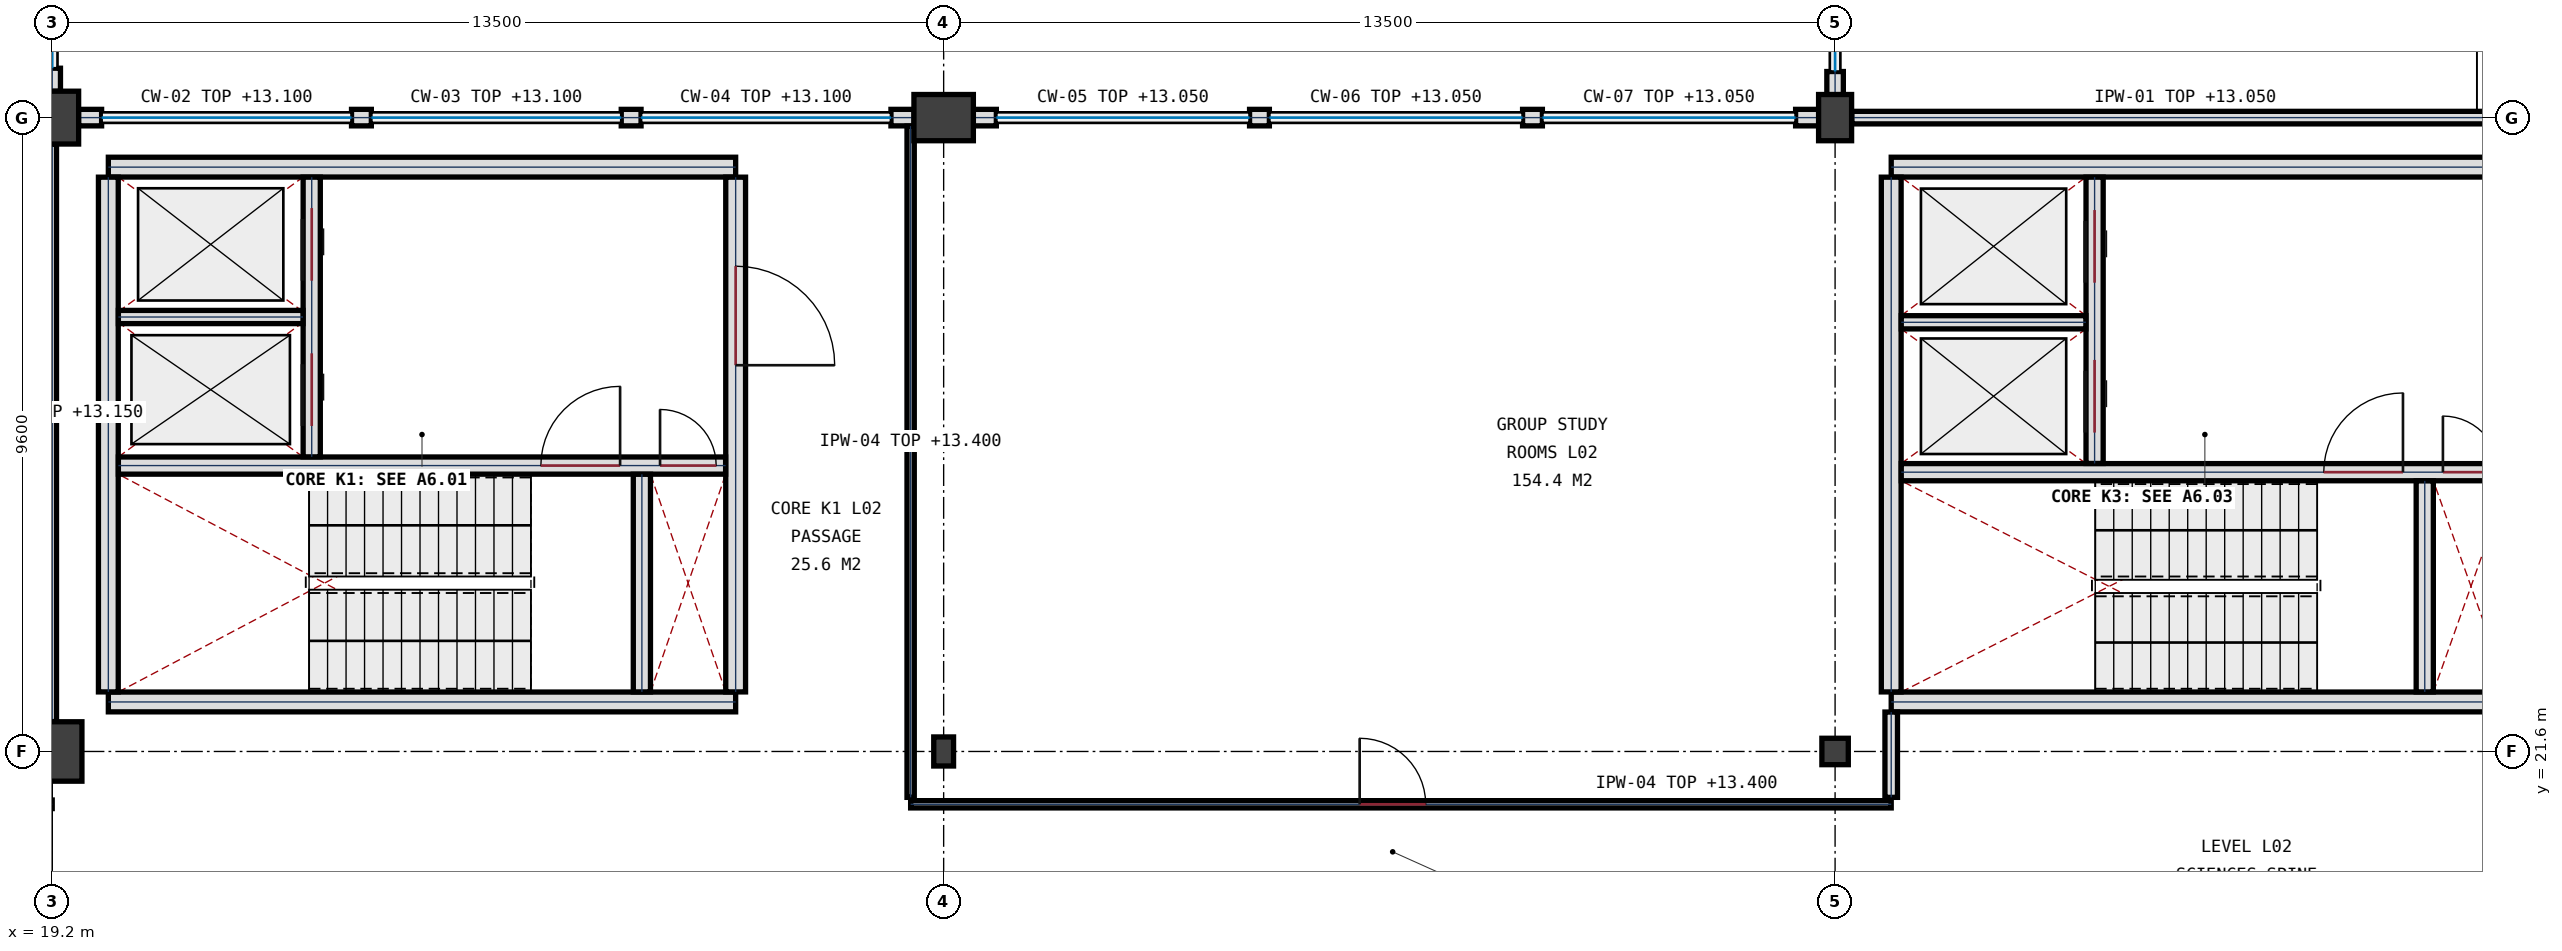
"""IFC4 building model, lengths in metres.
Left out: names, types, materials, properties, quantities, classifications, styles, units other than length and angle.
Written with IfcOpenShell. Run it as: python <this file> out.ifc"""

import sys

from ifc_helpers import new_model, si_unit, direction, frame, frame_2d, origin, origin_2d, place, context, subcontext, project, spatial, rectangle, hollow_rectangle, circle, i_section, extrude, element, fill, save


model = new_model("IFC4")
c1 = context("Model", 3, precision=1e-05, world=origin(), true_north=direction((0.0, 1.0)))
c2 = subcontext(c1, "Body", "Model", "MODEL_VIEW")
j1 = project(units=[si_unit("LENGTHUNIT", "METRE"), si_unit("PLANEANGLEUNIT", "RADIAN")], contexts=[c1])
p1 = place(None, origin())
s1 = spatial("IfcSite", under=j1, at=p1, CompositionType="ELEMENT")
p2 = place(p1, origin())
s2 = spatial("IfcBuilding", under=s1, at=p2, CompositionType="ELEMENT")
p3 = place(p2, frame((0.0, 0.0, 9.9)))
s3 = spatial("IfcBuildingStorey", under=s2, at=p3, CompositionType="ELEMENT", Elevation=9.9)
p4 = place(p3, frame((19.2, 21.6, 0.0), z_axis=(0.0, 0.0, 1.0), x_axis=(1.0, 0.0, 0.0)))
e1 = element("IfcColumn", 1, at=p4, inside=s3, PredefinedType="COLUMN", context=c2, shape_type="SweptSolid", body=[
    extrude(circle(Radius=0.45, at=origin_2d()), origin(), (0.0, 0.0, 1.0), 4.5),
])
p5 = place(p3, frame((19.2, 31.2, 0.0), z_axis=(0.0, 0.0, 1.0), x_axis=(1.0, 0.0, 0.0)))
e2 = element("IfcColumn", 2, at=p5, inside=s3, PredefinedType="COLUMN", context=c2, shape_type="SweptSolid", body=[
    extrude(circle(Radius=0.4, at=origin_2d()), origin(), (0.0, 0.0, 1.0), 4.5),
])
p6 = place(p3, frame((32.7, 21.6, 0.0), z_axis=(0.0, 0.0, 1.0), x_axis=(1.0, 0.0, 0.0)))
e3 = element("IfcColumn", 3, at=p6, inside=s3, PredefinedType="COLUMN", context=c2, shape_type="SweptSolid", body=[
    extrude(i_section(OverallWidth=0.3, OverallDepth=0.44, WebThickness=0.011, FlangeThickness=0.021, FilletRadius=0.027, at=origin_2d()), origin(), (0.0, 0.0, 1.0), 4.5),
])
p7 = place(p3, frame((32.7, 31.2, 0.0), z_axis=(0.0, 0.0, 1.0), x_axis=(1.0, 0.0, 0.0)))
e4 = element("IfcColumn", 4, at=p7, inside=s3, PredefinedType="COLUMN", context=c2, shape_type="SweptSolid", body=[
    extrude(rectangle(XDim=0.9, YDim=0.7, at=origin_2d()), origin(), (0.0, 0.0, 1.0), 4.5),
])
p8 = place(p3, frame((46.2, 21.6, 0.0), z_axis=(0.0, 0.0, 1.0), x_axis=(1.0, 0.0, 0.0)))
e5 = element("IfcColumn", 5, at=p8, inside=s3, PredefinedType="COLUMN", context=c2, shape_type="SweptSolid", body=[
    extrude(hollow_rectangle(XDim=0.4, YDim=0.4, WallThickness=0.016, at=origin_2d()), origin(), (0.0, 0.0, 1.0), 4.5),
])
p9 = place(p3, frame((46.2, 31.2, 0.0), z_axis=(0.0, 0.0, 1.0), x_axis=(0.0, 1.0, 0.0)))
e6 = element("IfcColumn", 6, at=p9, inside=s3, PredefinedType="COLUMN", context=c2, shape_type="SweptSolid", body=[
    extrude(rectangle(XDim=0.7, YDim=0.5, at=origin_2d()), origin(), (0.0, 0.0, 1.0), 4.5),
])
p10 = place(p3, frame((19.2, 31.948, 0.0), z_axis=(0.0, 0.0, 1.0), x_axis=(0.0, -1.0, 0.0)))
e7 = element("IfcWall", 7, at=p10, inside=s3, PredefinedType="SOLIDWALL", context=c2, shape_type="SweptSolid", body=[
    extrude(rectangle(XDim=0.35, YDim=0.25, at=frame_2d((0.175, 0.0))), origin(), (0.0, 0.0, 1.0), 3.25),
])
p11 = place(p3, frame((19.598, 31.2, 0.0), z_axis=(0.0, 0.0, 1.0), x_axis=(1.0, 0.0, 0.0)))
e8 = element("IfcWall", 8, at=p11, inside=s3, PredefinedType="SOLIDWALL", context=c2, shape_type="SweptSolid", body=[
    extrude(rectangle(XDim=0.35, YDim=0.25, at=frame_2d((0.175, 0.0))), origin(), (0.0, 0.0, 1.0), 3.2),
])
p12 = place(p3, frame((31.902, 31.2, 0.0), z_axis=(0.0, 0.0, 1.0), x_axis=(1.0, 0.0, 0.0)))
e9 = element("IfcWall", 9, at=p12, inside=s3, PredefinedType="SOLIDWALL", context=c2, shape_type="SweptSolid", body=[
    extrude(rectangle(XDim=0.35, YDim=0.25, at=frame_2d((0.175, 0.0))), origin(), (0.0, 0.0, 1.0), 3.2),
])
for number, where, z_axis, x_axis in (
    (10, (23.733, 31.2, 0.0), (0.0, 0.0, 1.0), (1.0, 0.0, 0.0)),
    (11, (27.817, 31.2, 0.0), (0.0, 0.0, 1.0), (1.0, 0.0, 0.0)),
):
    element("IfcWall", number, at=place(p3, frame(where, z_axis=z_axis, x_axis=x_axis)), inside=s3, PredefinedType="SOLIDWALL", context=c2, shape_type="SweptSolid", body=[
        extrude(rectangle(XDim=0.3, YDim=0.25, at=frame_2d((0.15, 0.0))), origin(), (0.0, 0.0, 1.0), 3.2),
    ])
p13 = place(p3, frame((33.148, 31.2, 0.0), z_axis=(0.0, 0.0, 1.0), x_axis=(1.0, 0.0, 0.0)))
e12 = element("IfcWall", 12, at=p13, inside=s3, PredefinedType="SOLIDWALL", context=c2, shape_type="SweptSolid", body=[
    extrude(rectangle(XDim=0.35, YDim=0.25, at=frame_2d((0.175, 0.0))), origin(), (0.0, 0.0, 1.0), 3.15),
])
p14 = place(p3, frame((45.602, 31.2, 0.0), z_axis=(0.0, 0.0, 1.0), x_axis=(1.0, 0.0, 0.0)))
e13 = element("IfcWall", 13, at=p14, inside=s3, PredefinedType="SOLIDWALL", context=c2, shape_type="SweptSolid", body=[
    extrude(rectangle(XDim=0.35, YDim=0.25, at=frame_2d((0.175, 0.0))), origin(), (0.0, 0.0, 1.0), 3.15),
])
p15 = place(p3, frame((37.333, 31.2, 0.0), z_axis=(0.0, 0.0, 1.0), x_axis=(1.0, 0.0, 0.0)))
e14 = element("IfcWall", 14, at=p15, inside=s3, PredefinedType="SOLIDWALL", context=c2, shape_type="SweptSolid", body=[
    extrude(rectangle(XDim=0.3, YDim=0.25, at=frame_2d((0.15, 0.0))), origin(), (0.0, 0.0, 1.0), 3.15),
])
p16 = place(p3, frame((41.467, 31.2, 0.0), z_axis=(0.0, 0.0, 1.0), x_axis=(1.0, 0.0, 0.0)))
e15 = element("IfcWall", 15, at=p16, inside=s3, PredefinedType="SOLIDWALL", context=c2, shape_type="SweptSolid", body=[
    extrude(rectangle(XDim=0.3, YDim=0.25, at=frame_2d((0.15, 0.0))), origin(), (0.0, 0.0, 1.0), 3.15),
])
p17 = place(p3, frame((46.2, 31.548, 0.0), z_axis=(0.0, 0.0, 1.0), x_axis=(0.0, 1.0, 0.0)))
e16 = element("IfcWall", 16, at=p17, inside=s3, PredefinedType="SOLIDWALL", context=c2, shape_type="SweptSolid", body=[
    extrude(rectangle(XDim=0.35, YDim=0.25, at=frame_2d((0.175, 0.0))), origin(), (0.0, 0.0, 1.0), 3.15),
])
for number, where, z_axis, x_axis in (
    (17, (29.55, 22.35, 0.0), (0.0, 0.0, 1.0), (-1.0, 0.0, 0.0)),
    (18, (20.05, 30.45, 0.0), (0.0, 0.0, 1.0), (1.0, 0.0, 0.0)),
):
    element("IfcWall", number, at=place(p3, frame(where, z_axis=z_axis, x_axis=x_axis)), inside=s3, PredefinedType="SHEAR", context=c2, shape_type="SweptSolid", body=[
        extrude(rectangle(XDim=9.5, YDim=0.3, at=frame_2d((4.75, 0.0))), origin(), (0.0, 0.0, 1.0), 4.5),
    ])
p18 = place(p3, frame((20.05, 22.502, 0.0), z_axis=(0.0, 0.0, 1.0), x_axis=(0.0, 1.0, 0.0)))
e19 = element("IfcWall", 19, at=p18, inside=s3, PredefinedType="SHEAR", context=c2, shape_type="SweptSolid", body=[
    extrude(rectangle(XDim=7.796, YDim=0.3, at=frame_2d((3.898, 0.0))), origin(), (0.0, 0.0, 1.0), 4.5),
])
p19 = place(p3, frame((29.55, 30.298, 0.0), z_axis=(0.0, 0.0, 1.0), x_axis=(0.0, -1.0, 0.0)))
e20 = element("IfcWall", 20, at=p19, inside=s3, PredefinedType="SHEAR", context=c2, shape_type="SweptSolid", body=[
    extrude(rectangle(XDim=7.796, YDim=0.3, at=frame_2d((3.898, 0.0))), origin(), (0.0, 0.0, 1.0), 4.5),
])
p20 = place(p19, frame((1.348, 0.0, 0.0)))
e21 = element("IfcOpeningElement", 21, at=p20, cuts=e20, PredefinedType="OPENING", context=c2, shape_type="SweptSolid", body=[
    extrude(rectangle(XDim=1.5, YDim=2.25, at=frame_2d((0.75, 1.125))), frame((0.0, 0.16, 0.0), z_axis=(0.0, -1.0, 0.0), x_axis=(1.0, 0.0, 0.0)), (0.0, 0.0, 1.0), 0.32),
])
p21 = place(p3, frame((20.202, 25.93, 0.0), z_axis=(0.0, 0.0, 1.0), x_axis=(1.0, 0.0, 0.0)))
e22 = element("IfcWall", 22, at=p21, inside=s3, PredefinedType="SHEAR", context=c2, shape_type="SweptSolid", body=[
    extrude(rectangle(XDim=9.196, YDim=0.26, at=frame_2d((4.598, 0.0))), origin(), (0.0, 0.0, 1.0), 4.5),
])
p22 = place(p21, frame((6.398, 0.0, 0.0)))
e23 = element("IfcOpeningElement", 23, at=p22, cuts=e22, PredefinedType="OPENING", context=c2, shape_type="SweptSolid", body=[
    extrude(rectangle(XDim=1.2, YDim=2.2, at=frame_2d((0.6, 1.1))), frame((0.0, 0.14, 0.0), z_axis=(0.0, -1.0, 0.0), x_axis=(1.0, 0.0, 0.0)), (0.0, 0.0, 1.0), 0.28),
])
p23 = place(p21, frame((8.203, 0.0, 0.0)))
e24 = element("IfcOpeningElement", 24, at=p23, cuts=e22, PredefinedType="OPENING", context=c2, shape_type="SweptSolid", body=[
    extrude(rectangle(XDim=0.85, YDim=2.05, at=frame_2d((0.425, 1.025))), frame((0.0, 0.14, 0.0), z_axis=(0.0, -1.0, 0.0), x_axis=(1.0, 0.0, 0.0)), (0.0, 0.0, 1.0), 0.28),
])
p24 = place(p3, frame((28.13, 22.502, 0.0), z_axis=(0.0, 0.0, 1.0), x_axis=(0.0, 1.0, 0.0)))
e25 = element("IfcWall", 25, at=p24, inside=s3, PredefinedType="SHEAR", context=c2, shape_type="SweptSolid", body=[
    extrude(rectangle(XDim=3.296, YDim=0.26, at=frame_2d((1.648, 0.0))), origin(), (0.0, 0.0, 1.0), 4.5),
])
p25 = place(p3, frame((23.13, 26.062, 0.0), z_axis=(0.0, 0.0, 1.0), x_axis=(0.0, 1.0, 0.0)))
e26 = element("IfcWall", 26, at=p25, inside=s3, PredefinedType="SHEAR", context=c2, shape_type="SweptSolid", body=[
    extrude(rectangle(XDim=4.236, YDim=0.26, at=frame_2d((2.118, 0.0))), origin(), (0.0, 0.0, 1.0), 4.5),
])
p26 = place(p25, frame((0.468, 0.0, 0.0)))
e27 = element("IfcOpeningElement", 27, at=p26, cuts=e26, PredefinedType="OPENING", context=c2, shape_type="SweptSolid", body=[
    extrude(rectangle(XDim=1.1, YDim=2.15, at=frame_2d((0.55, 1.075))), frame((0.0, 0.14, 0.0), z_axis=(0.0, -1.0, 0.0), x_axis=(1.0, 0.0, 0.0)), (0.0, 0.0, 1.0), 0.28),
])
p27 = place(p25, frame((2.668, 0.0, 0.0)))
e28 = element("IfcOpeningElement", 28, at=p27, cuts=e26, PredefinedType="OPENING", context=c2, shape_type="SweptSolid", body=[
    extrude(rectangle(XDim=1.1, YDim=2.15, at=frame_2d((0.55, 1.075))), frame((0.0, 0.14, 0.0), z_axis=(0.0, -1.0, 0.0), x_axis=(1.0, 0.0, 0.0)), (0.0, 0.0, 1.0), 0.28),
])
p28 = place(p3, frame((20.202, 28.18, 0.0), z_axis=(0.0, 0.0, 1.0), x_axis=(1.0, 0.0, 0.0)))
e29 = element("IfcWall", 29, at=p28, inside=s3, PredefinedType="PLUMBINGWALL", context=c2, shape_type="SweptSolid", body=[
    extrude(rectangle(XDim=2.796, YDim=0.2, at=frame_2d((1.398, 0.0))), origin(), (0.0, 0.0, 1.0), 4.16),
])
for number, where, z_axis, x_axis in (
    (30, (56.55, 22.35, 0.0), (0.0, 0.0, 1.0), (-1.0, 0.0, 0.0)),
    (31, (47.05, 30.45, 0.0), (0.0, 0.0, 1.0), (1.0, 0.0, 0.0)),
):
    element("IfcWall", number, at=place(p3, frame(where, z_axis=z_axis, x_axis=x_axis)), inside=s3, PredefinedType="SHEAR", context=c2, shape_type="SweptSolid", body=[
        extrude(rectangle(XDim=9.5, YDim=0.3, at=frame_2d((4.75, 0.0))), origin(), (0.0, 0.0, 1.0), 4.5),
    ])
p29 = place(p3, frame((47.05, 22.502, 0.0), z_axis=(0.0, 0.0, 1.0), x_axis=(0.0, 1.0, 0.0)))
e32 = element("IfcWall", 32, at=p29, inside=s3, PredefinedType="SHEAR", context=c2, shape_type="SweptSolid", body=[
    extrude(rectangle(XDim=7.796, YDim=0.3, at=frame_2d((3.898, 0.0))), origin(), (0.0, 0.0, 1.0), 4.5),
])
p30 = place(p3, frame((47.202, 25.83, 0.0), z_axis=(0.0, 0.0, 1.0), x_axis=(1.0, 0.0, 0.0)))
e33 = element("IfcWall", 33, at=p30, inside=s3, PredefinedType="SHEAR", context=c2, shape_type="SweptSolid", body=[
    extrude(rectangle(XDim=9.196, YDim=0.26, at=frame_2d((4.598, 0.0))), origin(), (0.0, 0.0, 1.0), 4.5),
])
p31 = place(p30, frame((6.398, 0.0, 0.0)))
e34 = element("IfcOpeningElement", 34, at=p31, cuts=e33, PredefinedType="OPENING", context=c2, shape_type="SweptSolid", body=[
    extrude(rectangle(XDim=1.2, YDim=2.2, at=frame_2d((0.6, 1.1))), frame((0.0, 0.14, 0.0), z_axis=(0.0, -1.0, 0.0), x_axis=(1.0, 0.0, 0.0)), (0.0, 0.0, 1.0), 0.28),
])
p32 = place(p30, frame((8.203, 0.0, 0.0)))
e35 = element("IfcOpeningElement", 35, at=p32, cuts=e33, PredefinedType="OPENING", context=c2, shape_type="SweptSolid", body=[
    extrude(rectangle(XDim=0.85, YDim=2.05, at=frame_2d((0.425, 1.025))), frame((0.0, 0.14, 0.0), z_axis=(0.0, -1.0, 0.0), x_axis=(1.0, 0.0, 0.0)), (0.0, 0.0, 1.0), 0.28),
])
p33 = place(p3, frame((55.13, 22.502, 0.0), z_axis=(0.0, 0.0, 1.0), x_axis=(0.0, 1.0, 0.0)))
e36 = element("IfcWall", 36, at=p33, inside=s3, PredefinedType="SHEAR", context=c2, shape_type="SweptSolid", body=[
    extrude(rectangle(XDim=3.196, YDim=0.26, at=frame_2d((1.598, 0.0))), origin(), (0.0, 0.0, 1.0), 4.5),
])
p34 = place(p3, frame((50.13, 25.962, 0.0), z_axis=(0.0, 0.0, 1.0), x_axis=(0.0, 1.0, 0.0)))
e37 = element("IfcWall", 37, at=p34, inside=s3, PredefinedType="SHEAR", context=c2, shape_type="SweptSolid", body=[
    extrude(rectangle(XDim=4.336, YDim=0.26, at=frame_2d((2.168, 0.0))), origin(), (0.0, 0.0, 1.0), 4.5),
])
p35 = place(p34, frame((0.468, 0.0, 0.0)))
e38 = element("IfcOpeningElement", 38, at=p35, cuts=e37, PredefinedType="OPENING", context=c2, shape_type="SweptSolid", body=[
    extrude(rectangle(XDim=1.1, YDim=2.15, at=frame_2d((0.55, 1.075))), frame((0.0, 0.14, 0.0), z_axis=(0.0, -1.0, 0.0), x_axis=(1.0, 0.0, 0.0)), (0.0, 0.0, 1.0), 0.28),
])
p36 = place(p34, frame((2.738, 0.0, 0.0)))
e39 = element("IfcOpeningElement", 39, at=p36, cuts=e37, PredefinedType="OPENING", context=c2, shape_type="SweptSolid", body=[
    extrude(rectangle(XDim=1.1, YDim=2.15, at=frame_2d((0.55, 1.075))), frame((0.0, 0.14, 0.0), z_axis=(0.0, -1.0, 0.0), x_axis=(1.0, 0.0, 0.0)), (0.0, 0.0, 1.0), 0.28),
])
p37 = place(p3, frame((47.202, 28.1, 0.0), z_axis=(0.0, 0.0, 1.0), x_axis=(1.0, 0.0, 0.0)))
e40 = element("IfcWall", 40, at=p37, inside=s3, PredefinedType="PLUMBINGWALL", context=c2, shape_type="SweptSolid", body=[
    extrude(rectangle(XDim=2.796, YDim=0.2, at=frame_2d((1.398, 0.0))), origin(), (0.0, 0.0, 1.0), 4.16),
])
p38 = place(p3, frame((32.2, 20.8, 0.0), z_axis=(0.0, 0.0, 1.0), x_axis=(1.0, 0.0, 0.0)))
e41 = element("IfcWall", 41, at=p38, inside=s3, PredefinedType="PARTITIONING", context=c2, shape_type="SweptSolid", body=[
    extrude(rectangle(XDim=14.85, YDim=0.11, at=frame_2d((7.425, 0.0))), origin(), (0.0, 0.0, 1.0), 3.5),
])
p39 = place(p38, frame((6.8, 0.0, 0.0)))
e42 = element("IfcOpeningElement", 42, at=p39, cuts=e41, PredefinedType="OPENING", context=c2, shape_type="SweptSolid", body=[
    extrude(rectangle(XDim=1.0, YDim=2.2, at=frame_2d((0.5, 1.1))), frame((0.0, 0.065, 0.0), z_axis=(0.0, -1.0, 0.0), x_axis=(1.0, 0.0, 0.0)), (0.0, 0.0, 1.0), 0.13),
])
p40 = place(p3, frame((46.453, 31.2, 0.0), z_axis=(0.0, 0.0, 1.0), x_axis=(1.0, 0.0, 0.0)))
e43 = element("IfcWall", 43, at=p40, inside=s3, PredefinedType="PARTITIONING", context=c2, shape_type="SweptSolid", body=[
    extrude(rectangle(XDim=10.097, YDim=0.19, at=frame_2d((5.049, 0.0))), origin(), (0.0, 0.0, 1.0), 3.15),
])
p41 = place(p3, frame((19.2, 22.053, 0.0), z_axis=(0.0, 0.0, 1.0), x_axis=(0.0, 1.0, 0.0)))
e44 = element("IfcWall", 44, at=p41, inside=s3, PredefinedType="PARTITIONING", context=c2, shape_type="SweptSolid", body=[
    extrude(rectangle(XDim=8.744, YDim=0.13, at=frame_2d((4.372, 0.0))), origin(), (0.0, 0.0, 1.0), 3.25),
])
p42 = place(p3, frame((32.2, 20.905, 0.0), z_axis=(0.0, 0.0, 1.0), x_axis=(0.0, 1.0, 0.0)))
e45 = element("IfcWall", 45, at=p42, inside=s3, PredefinedType="PARTITIONING", context=c2, shape_type="SweptSolid", body=[
    extrude(rectangle(XDim=10.166, YDim=0.11, at=frame_2d((5.083, 0.0))), origin(), (0.0, 0.0, 1.0), 3.5),
])
p43 = place(p3, frame((47.05, 20.905, 0.0), z_axis=(0.0, 0.0, 1.0), x_axis=(0.0, 1.0, 0.0)))
e46 = element("IfcWall", 46, at=p43, inside=s3, PredefinedType="PARTITIONING", context=c2, shape_type="SweptSolid", body=[
    extrude(rectangle(XDim=1.292, YDim=0.19, at=frame_2d((0.646, 0.0))), origin(), (0.0, 0.0, 1.0), 3.3),
])
p44 = place(p20, origin())
e47 = element("IfcDoor", 47, at=p44, inside=s3, OperationType="SINGLE_SWING_RIGHT", PredefinedType="DOOR", context=c2, shape_type="SweptSolid", body=[
    extrude(rectangle(XDim=1.5, YDim=2.25, at=frame_2d((0.75, 1.125))), frame((0.0, 0.032, 0.0), z_axis=(0.0, -1.0, 0.0), x_axis=(1.0, 0.0, 0.0)), (0.0, 0.0, 1.0), 0.065),
])
fill(e21, e47)
p45 = place(p22, origin())
e48 = element("IfcDoor", 48, at=p45, inside=s3, OperationType="SINGLE_SWING_RIGHT", PredefinedType="DOOR", context=c2, shape_type="SweptSolid", body=[
    extrude(rectangle(XDim=1.2, YDim=2.2, at=frame_2d((0.6, 1.1))), frame((0.0, 0.032, 0.0), z_axis=(0.0, -1.0, 0.0), x_axis=(1.0, 0.0, 0.0)), (0.0, 0.0, 1.0), 0.065),
])
fill(e23, e48)
p46 = place(p23, origin())
e49 = element("IfcDoor", 49, at=p46, inside=s3, OperationType="SINGLE_SWING_LEFT", PredefinedType="DOOR", context=c2, shape_type="SweptSolid", body=[
    extrude(rectangle(XDim=0.85, YDim=2.05, at=frame_2d((0.425, 1.025))), frame((0.0, 0.032, 0.0), z_axis=(0.0, -1.0, 0.0), x_axis=(1.0, 0.0, 0.0)), (0.0, 0.0, 1.0), 0.065),
])
fill(e24, e49)
p47 = place(p26, origin())
e50 = element("IfcDoor", 50, at=p47, inside=s3, OperationType="SLIDING_TO_LEFT", PredefinedType="DOOR", context=c2, shape_type="SweptSolid", body=[
    extrude(rectangle(XDim=1.1, YDim=2.15, at=frame_2d((0.55, 1.075))), frame((0.0, 0.032, 0.0), z_axis=(0.0, -1.0, 0.0), x_axis=(1.0, 0.0, 0.0)), (0.0, 0.0, 1.0), 0.065),
])
fill(e27, e50)
p48 = place(p27, origin())
e51 = element("IfcDoor", 51, at=p48, inside=s3, OperationType="SLIDING_TO_LEFT", PredefinedType="DOOR", context=c2, shape_type="SweptSolid", body=[
    extrude(rectangle(XDim=1.1, YDim=2.15, at=frame_2d((0.55, 1.075))), frame((0.0, 0.032, 0.0), z_axis=(0.0, -1.0, 0.0), x_axis=(1.0, 0.0, 0.0)), (0.0, 0.0, 1.0), 0.065),
])
fill(e28, e51)
p49 = place(p31, origin())
e52 = element("IfcDoor", 52, at=p49, inside=s3, OperationType="SINGLE_SWING_RIGHT", PredefinedType="DOOR", context=c2, shape_type="SweptSolid", body=[
    extrude(rectangle(XDim=1.2, YDim=2.2, at=frame_2d((0.6, 1.1))), frame((0.0, 0.032, 0.0), z_axis=(0.0, -1.0, 0.0), x_axis=(1.0, 0.0, 0.0)), (0.0, 0.0, 1.0), 0.065),
])
fill(e34, e52)
p50 = place(p32, origin())
e53 = element("IfcDoor", 53, at=p50, inside=s3, OperationType="SINGLE_SWING_LEFT", PredefinedType="DOOR", context=c2, shape_type="SweptSolid", body=[
    extrude(rectangle(XDim=0.85, YDim=2.05, at=frame_2d((0.425, 1.025))), frame((0.0, 0.032, 0.0), z_axis=(0.0, -1.0, 0.0), x_axis=(1.0, 0.0, 0.0)), (0.0, 0.0, 1.0), 0.065),
])
fill(e35, e53)
p51 = place(p35, origin())
e54 = element("IfcDoor", 54, at=p51, inside=s3, OperationType="SLIDING_TO_LEFT", PredefinedType="DOOR", context=c2, shape_type="SweptSolid", body=[
    extrude(rectangle(XDim=1.1, YDim=2.15, at=frame_2d((0.55, 1.075))), frame((0.0, 0.032, 0.0), z_axis=(0.0, -1.0, 0.0), x_axis=(1.0, 0.0, 0.0)), (0.0, 0.0, 1.0), 0.065),
])
fill(e38, e54)
p52 = place(p36, origin())
e55 = element("IfcDoor", 55, at=p52, inside=s3, OperationType="SLIDING_TO_LEFT", PredefinedType="DOOR", context=c2, shape_type="SweptSolid", body=[
    extrude(rectangle(XDim=1.1, YDim=2.15, at=frame_2d((0.55, 1.075))), frame((0.0, 0.032, 0.0), z_axis=(0.0, -1.0, 0.0), x_axis=(1.0, 0.0, 0.0)), (0.0, 0.0, 1.0), 0.065),
])
fill(e39, e55)
p53 = place(p39, origin())
e56 = element("IfcDoor", 56, at=p53, inside=s3, OperationType="SINGLE_SWING_LEFT", PredefinedType="DOOR", context=c2, shape_type="SweptSolid", body=[
    extrude(rectangle(XDim=1.0, YDim=2.2, at=frame_2d((0.5, 1.1))), frame((0.0, 0.032, 0.0), z_axis=(0.0, -1.0, 0.0), x_axis=(1.0, 0.0, 0.0)), (0.0, 0.0, 1.0), 0.065),
])
fill(e42, e56)
save(model, sys.argv[1])
